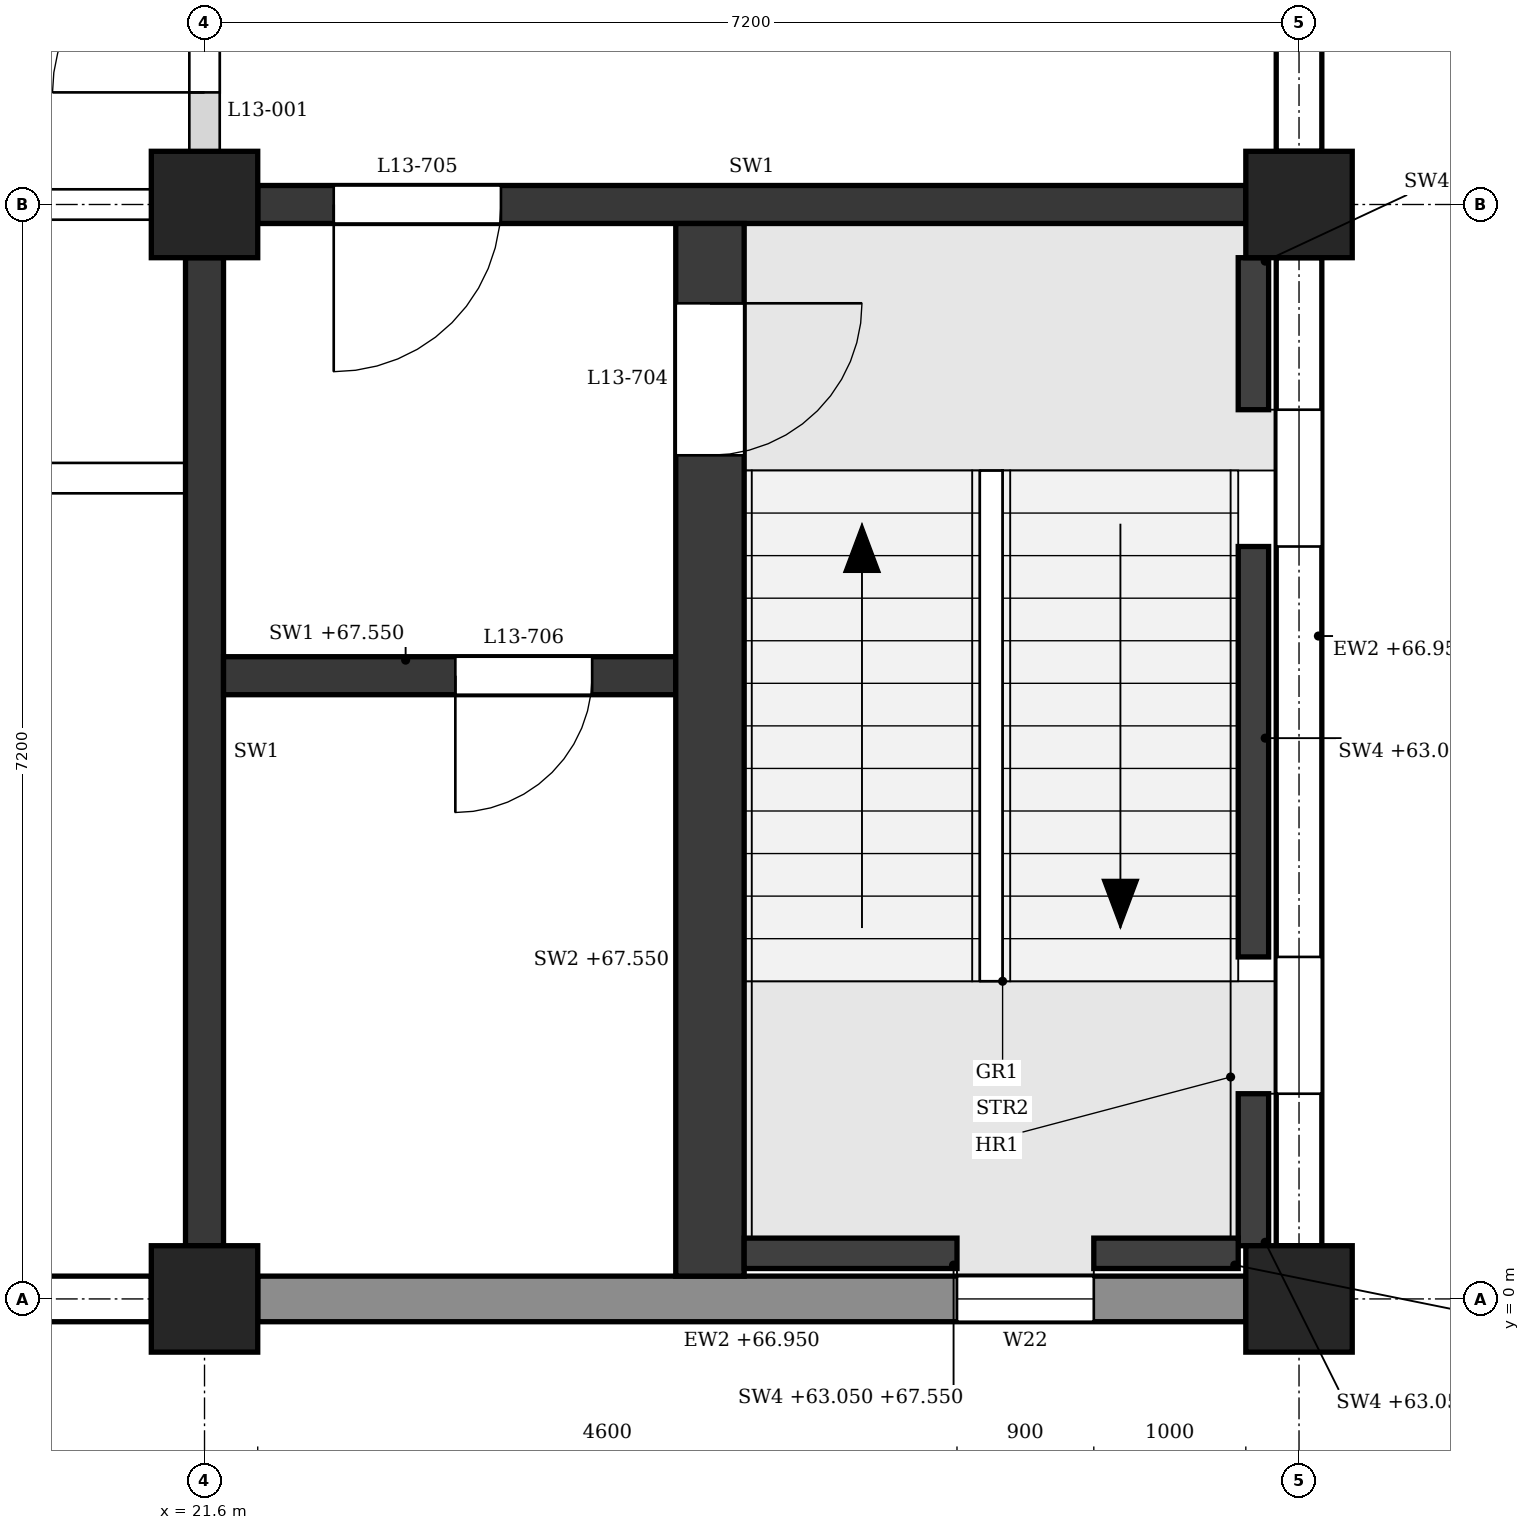
"""IFC4 building model, lengths in metres.
Left out: names, types, materials, properties, quantities, classifications, styles, units other than length and angle.
Written with IfcOpenShell. Run it as: python <this file> out.ifc"""

import sys

from ifc_helpers import new_model, si_unit, direction, frame, frame_2d, origin, origin_2d, place, context, subcontext, project, spatial, polyline, rectangle, outline, extrude, element, fill, save


model = new_model("IFC4")
c1 = context("Model", 3, precision=1e-05, world=origin(), true_north=direction((0.0, 1.0)))
c2 = subcontext(c1, "Body", "Model", "MODEL_VIEW")
j1 = project(units=[si_unit("LENGTHUNIT", "METRE"), si_unit("PLANEANGLEUNIT", "RADIAN")], contexts=[c1])
p1 = place(None, origin())
s1 = spatial("IfcSite", under=j1, at=p1, CompositionType="ELEMENT")
p2 = place(p1, origin())
s2 = spatial("IfcBuilding", under=s1, at=p2, CompositionType="ELEMENT")
p3 = place(p2, frame((0.0, 0.0, 63.3)))
s3 = spatial("IfcBuildingStorey", under=s2, at=p3, CompositionType="ELEMENT", Elevation=63.3)
for number, where, z_axis, x_axis in (
    (1, (21.6, 0.0, 0.0), (0.0, 0.0, 1.0), (1.0, 0.0, 0.0)),
    (2, (21.6, 7.2, 0.0), (0.0, 0.0, 1.0), (1.0, 0.0, 0.0)),
    (3, (28.8, 0.0, 0.0), (0.0, 0.0, 1.0), (1.0, 0.0, 0.0)),
    (4, (28.8, 7.2, 0.0), (0.0, 0.0, 1.0), (1.0, 0.0, 0.0)),
):
    element("IfcColumn", number, at=place(p3, frame(where, z_axis=z_axis, x_axis=x_axis)), inside=s3, PredefinedType="COLUMN", context=c2, shape_type="SweptSolid", body=[
        extrude(rectangle(XDim=0.7, YDim=0.7, at=origin_2d()), origin(), (0.0, 0.0, 1.0), 4.5),
    ])
p4 = place(p3, frame((14.75, 0.0, 0.0), z_axis=(0.0, 0.0, 1.0), x_axis=(1.0, 0.0, 0.0)))
e5 = element("IfcWall", 5, at=p4, inside=s3, PredefinedType="STANDARD", context=c2, shape_type="SweptSolid", body=[
    extrude(rectangle(XDim=6.5, YDim=0.3, at=frame_2d((3.25, 0.0))), origin(), (0.0, 0.0, 1.0), 3.65),
])
p5 = place(p4, frame((0.7, 0.0, 0.9)))
e6 = element("IfcOpeningElement", 6, at=p5, cuts=e5, PredefinedType="OPENING", context=c2, shape_type="SweptSolid", body=[
    extrude(outline(polyline([(0.0, 0.0), (1.5, 0.0), (1.5, 1.95), (0.75, 2.7), (0.0, 1.95), (0.0, 0.0)])), frame((0.0, 0.16, 0.0), z_axis=(0.0, -1.0, 0.0), x_axis=(1.0, 0.0, 0.0)), (0.0, 0.0, 1.0), 0.32),
])
p6 = place(p4, frame((4.3, 0.0, 0.9)))
e7 = element("IfcOpeningElement", 7, at=p6, cuts=e5, PredefinedType="OPENING", context=c2, shape_type="SweptSolid", body=[
    extrude(outline(polyline([(0.0, 0.0), (1.5, 0.0), (1.5, 1.95), (0.75, 2.7), (0.0, 1.95), (0.0, 0.0)])), frame((0.0, 0.16, 0.0), z_axis=(0.0, -1.0, 0.0), x_axis=(1.0, 0.0, 0.0)), (0.0, 0.0, 1.0), 0.32),
])
p7 = place(p3, frame((21.95, 0.0, 0.0), z_axis=(0.0, 0.0, 1.0), x_axis=(1.0, 0.0, 0.0)))
e8 = element("IfcWall", 8, at=p7, inside=s3, PredefinedType="STANDARD", context=c2, shape_type="SweptSolid", body=[
    extrude(rectangle(XDim=6.5, YDim=0.3, at=frame_2d((3.25, 0.0))), origin(), (0.0, 0.0, 1.0), 3.65),
])
p8 = place(p7, frame((4.6, 0.0, 0.9)))
e9 = element("IfcOpeningElement", 9, at=p8, cuts=e8, PredefinedType="OPENING", context=c2, shape_type="SweptSolid", body=[
    extrude(outline(polyline([(0.0, 0.0), (0.9, 0.0), (0.9, 2.25), (0.45, 2.7), (0.0, 2.25), (0.0, 0.0)])), frame((0.0, 0.16, 0.0), z_axis=(0.0, -1.0, 0.0), x_axis=(1.0, 0.0, 0.0)), (0.0, 0.0, 1.0), 0.32),
])
p9 = place(p3, frame((28.8, 0.35, 0.0), z_axis=(0.0, 0.0, 1.0), x_axis=(0.0, 1.0, 0.0)))
e10 = element("IfcWall", 10, at=p9, inside=s3, PredefinedType="STANDARD", context=c2, shape_type="SweptSolid", body=[
    extrude(rectangle(XDim=6.5, YDim=0.3, at=frame_2d((3.25, 0.0))), origin(), (0.0, 0.0, 1.0), 3.65),
])
p10 = place(p9, frame((1.0, 0.0, 0.9)))
e11 = element("IfcOpeningElement", 11, at=p10, cuts=e10, PredefinedType="OPENING", context=c2, shape_type="SweptSolid", body=[
    extrude(outline(polyline([(0.0, 0.0), (0.9, 0.0), (0.9, 2.25), (0.45, 2.7), (0.0, 2.25), (0.0, 0.0)])), frame((0.0, 0.16, 0.0), z_axis=(0.0, -1.0, 0.0), x_axis=(1.0, 0.0, 0.0)), (0.0, 0.0, 1.0), 0.32),
])
p11 = place(p9, frame((4.6, 0.0, 0.9)))
e12 = element("IfcOpeningElement", 12, at=p11, cuts=e10, PredefinedType="OPENING", context=c2, shape_type="SweptSolid", body=[
    extrude(outline(polyline([(0.0, 0.0), (0.9, 0.0), (0.9, 2.25), (0.45, 2.7), (0.0, 2.25), (0.0, 0.0)])), frame((0.0, 0.16, 0.0), z_axis=(0.0, -1.0, 0.0), x_axis=(1.0, 0.0, 0.0)), (0.0, 0.0, 1.0), 0.32),
])
p12 = place(p3, frame((28.8, 7.55, 0.0), z_axis=(0.0, 0.0, 1.0), x_axis=(0.0, 1.0, 0.0)))
e13 = element("IfcWall", 13, at=p12, inside=s3, PredefinedType="STANDARD", context=c2, shape_type="SweptSolid", body=[
    extrude(rectangle(XDim=6.5, YDim=0.3, at=frame_2d((3.25, 0.0))), origin(), (0.0, 0.0, 1.0), 3.65),
])
p13 = place(p12, frame((0.7, 0.0, 0.9)))
e14 = element("IfcOpeningElement", 14, at=p13, cuts=e13, PredefinedType="OPENING", context=c2, shape_type="SweptSolid", body=[
    extrude(outline(polyline([(0.0, 0.0), (1.5, 0.0), (1.5, 1.95), (0.75, 2.7), (0.0, 1.95), (0.0, 0.0)])), frame((0.0, 0.16, 0.0), z_axis=(0.0, -1.0, 0.0), x_axis=(1.0, 0.0, 0.0)), (0.0, 0.0, 1.0), 0.32),
])
p14 = place(p3, frame((21.95, 7.2, 0.0), z_axis=(0.0, 0.0, 1.0), x_axis=(1.0, 0.0, 0.0)))
e15 = element("IfcWall", 15, at=p14, inside=s3, PredefinedType="SHEAR", context=c2, shape_type="SweptSolid", body=[
    extrude(rectangle(XDim=6.5, YDim=0.25, at=frame_2d((3.25, 0.0))), origin(), (0.0, 0.0, 1.0), 3.6),
])
p15 = place(p14, frame((0.5, 0.0, 0.0)))
e16 = element("IfcOpeningElement", 16, at=p15, cuts=e15, PredefinedType="OPENING", context=c2, shape_type="SweptSolid", body=[
    extrude(rectangle(XDim=1.1, YDim=2.1, at=frame_2d((0.55, 1.05))), frame((0.0, 0.135, 0.0), z_axis=(0.0, -1.0, 0.0), x_axis=(1.0, 0.0, 0.0)), (0.0, 0.0, 1.0), 0.27),
])
p16 = place(p3, frame((21.6, 0.35, 0.0), z_axis=(0.0, 0.0, 1.0), x_axis=(0.0, 1.0, 0.0)))
e17 = element("IfcWall", 17, at=p16, inside=s3, PredefinedType="SHEAR", context=c2, shape_type="SweptSolid", body=[
    extrude(rectangle(XDim=6.5, YDim=0.25, at=frame_2d((3.25, 0.0))), origin(), (0.0, 0.0, 1.0), 3.6),
])
p17 = place(p3, frame((28.5, 0.35, -0.25), z_axis=(0.0, 0.0, 1.0), x_axis=(0.0, 1.0, 0.0)))
e18 = element("IfcWall", 18, at=p17, inside=s3, PredefinedType="SHEAR", context=c2, shape_type="SweptSolid", body=[
    extrude(rectangle(XDim=1.0, YDim=0.2, at=frame_2d((0.5, 0.0))), origin(), (0.0, 0.0, 1.0), 4.5),
])
p18 = place(p3, frame((28.5, 2.25, -0.25), z_axis=(0.0, 0.0, 1.0), x_axis=(0.0, 1.0, 0.0)))
e19 = element("IfcWall", 19, at=p18, inside=s3, PredefinedType="SHEAR", context=c2, shape_type="SweptSolid", body=[
    extrude(rectangle(XDim=2.7, YDim=0.2, at=frame_2d((1.35, 0.0))), origin(), (0.0, 0.0, 1.0), 4.5),
])
p19 = place(p3, frame((28.5, 5.85, -0.25), z_axis=(0.0, 0.0, 1.0), x_axis=(0.0, 1.0, 0.0)))
e20 = element("IfcWall", 20, at=p19, inside=s3, PredefinedType="SHEAR", context=c2, shape_type="SweptSolid", body=[
    extrude(rectangle(XDim=1.0, YDim=0.2, at=frame_2d((0.5, 0.0))), origin(), (0.0, 0.0, 1.0), 4.5),
])
p20 = place(p3, frame((25.15, 0.3, -0.25), z_axis=(0.0, 0.0, 1.0), x_axis=(1.0, 0.0, 0.0)))
e21 = element("IfcWall", 21, at=p20, inside=s3, PredefinedType="SHEAR", context=c2, shape_type="SweptSolid", body=[
    extrude(rectangle(XDim=1.4, YDim=0.2, at=frame_2d((0.7, 0.0))), origin(), (0.0, 0.0, 1.0), 4.5),
])
p21 = place(p3, frame((27.45, 0.3, -0.25), z_axis=(0.0, 0.0, 1.0), x_axis=(1.0, 0.0, 0.0)))
e22 = element("IfcWall", 22, at=p21, inside=s3, PredefinedType="SHEAR", context=c2, shape_type="SweptSolid", body=[
    extrude(rectangle(XDim=0.95, YDim=0.2, at=frame_2d((0.475, 0.0))), origin(), (0.0, 0.0, 1.0), 4.5),
])
p22 = place(p3, frame((24.925, 0.15, 0.0), z_axis=(0.0, 0.0, 1.0), x_axis=(0.0, 1.0, 0.0)))
e23 = element("IfcWall", 23, at=p22, inside=s3, PredefinedType="SHEAR", context=c2, shape_type="SweptSolid", body=[
    extrude(rectangle(XDim=6.925, YDim=0.45, at=frame_2d((3.462, 0.0))), origin(), (0.0, 0.0, 1.0), 4.25),
])
p23 = place(p22, frame((5.4, 0.0, 0.0)))
e24 = element("IfcOpeningElement", 24, at=p23, cuts=e23, PredefinedType="OPENING", context=c2, shape_type="SweptSolid", body=[
    extrude(rectangle(XDim=1.0, YDim=2.1, at=frame_2d((0.5, 1.05))), frame((0.0, 0.235, 0.0), z_axis=(0.0, -1.0, 0.0), x_axis=(1.0, 0.0, 0.0)), (0.0, 0.0, 1.0), 0.47),
])
p24 = place(p3, frame((21.725, 4.1, 0.0), z_axis=(0.0, 0.0, 1.0), x_axis=(1.0, 0.0, 0.0)))
e25 = element("IfcWall", 25, at=p24, inside=s3, PredefinedType="SHEAR", context=c2, shape_type="SweptSolid", body=[
    extrude(rectangle(XDim=2.975, YDim=0.25, at=frame_2d((1.487, 0.0))), origin(), (0.0, 0.0, 1.0), 4.25),
])
p25 = place(p24, frame((1.525, 0.0, 0.0)))
e26 = element("IfcOpeningElement", 26, at=p25, cuts=e25, PredefinedType="OPENING", context=c2, shape_type="SweptSolid", body=[
    extrude(rectangle(XDim=0.9, YDim=2.1, at=frame_2d((0.45, 1.05))), frame((0.0, 0.135, 0.0), z_axis=(0.0, -1.0, 0.0), x_axis=(1.0, 0.0, 0.0)), (0.0, 0.0, 1.0), 0.27),
])
p26 = place(p3, frame((7.325, 5.4, 0.0), z_axis=(0.0, 0.0, 1.0), x_axis=(1.0, 0.0, 0.0)))
e27 = element("IfcWall", 27, at=p26, inside=s3, PredefinedType="PARTITIONING", context=c2, shape_type="SweptSolid", body=[
    extrude(outline(polyline([(0.0, 0.0), (14.15, 0.0), (14.15, 3.6), (14.075, 3.6), (14.075, 4.25), (7.275, 4.25), (7.275, 3.6), (6.875, 3.6), (6.875, 4.25), (0.075, 4.25), (0.075, 3.6), (0.0, 3.6), (0.0, 0.0)])), frame((0.0, 0.1, 0.0), z_axis=(0.0, -1.0, 0.0), x_axis=(1.0, 0.0, 0.0)), (0.0, 0.0, 1.0), 0.2),
])
p27 = place(p26, frame((1.238, 0.0, 0.0)))
e28 = element("IfcOpeningElement", 28, at=p27, cuts=e27, PredefinedType="OPENING", context=c2, shape_type="SweptSolid", body=[
    extrude(rectangle(XDim=1.0, YDim=2.1, at=frame_2d((0.5, 1.05))), frame((0.0, 0.11, 0.0), z_axis=(0.0, -1.0, 0.0), x_axis=(1.0, 0.0, 0.0)), (0.0, 0.0, 1.0), 0.22),
])
p28 = place(p26, frame((4.775, 0.0, 0.0)))
e29 = element("IfcOpeningElement", 29, at=p28, cuts=e27, PredefinedType="OPENING", context=c2, shape_type="SweptSolid", body=[
    extrude(rectangle(XDim=1.0, YDim=2.1, at=frame_2d((0.5, 1.05))), frame((0.0, 0.11, 0.0), z_axis=(0.0, -1.0, 0.0), x_axis=(1.0, 0.0, 0.0)), (0.0, 0.0, 1.0), 0.22),
])
p29 = place(p26, frame((8.375, 0.0, 0.0)))
e30 = element("IfcOpeningElement", 30, at=p29, cuts=e27, PredefinedType="OPENING", context=c2, shape_type="SweptSolid", body=[
    extrude(rectangle(XDim=1.0, YDim=2.1, at=frame_2d((0.5, 1.05))), frame((0.0, 0.11, 0.0), z_axis=(0.0, -1.0, 0.0), x_axis=(1.0, 0.0, 0.0)), (0.0, 0.0, 1.0), 0.22),
])
p30 = place(p26, frame((11.913, 0.0, 0.0)))
e31 = element("IfcOpeningElement", 31, at=p30, cuts=e27, PredefinedType="OPENING", context=c2, shape_type="SweptSolid", body=[
    extrude(rectangle(XDim=1.0, YDim=2.1, at=frame_2d((0.5, 1.05))), frame((0.0, 0.11, 0.0), z_axis=(0.0, -1.0, 0.0), x_axis=(1.0, 0.0, 0.0)), (0.0, 0.0, 1.0), 0.22),
])
p31 = place(p3, frame((14.75, 7.2, 0.0), z_axis=(0.0, 0.0, 1.0), x_axis=(1.0, 0.0, 0.0)))
e32 = element("IfcWall", 32, at=p31, inside=s3, PredefinedType="PARTITIONING", context=c2, shape_type="SweptSolid", body=[
    extrude(rectangle(XDim=6.5, YDim=0.2, at=frame_2d((3.25, 0.0))), origin(), (0.0, 0.0, 1.0), 3.6),
])
p32 = place(p31, frame((4.375, 0.0, 0.0)))
e33 = element("IfcOpeningElement", 33, at=p32, cuts=e32, PredefinedType="OPENING", context=c2, shape_type="SweptSolid", body=[
    extrude(rectangle(XDim=1.0, YDim=2.1, at=frame_2d((0.5, 1.05))), frame((0.0, 0.11, 0.0), z_axis=(0.0, -1.0, 0.0), x_axis=(1.0, 0.0, 0.0)), (0.0, 0.0, 1.0), 0.22),
])
p33 = place(p3, frame((21.6, 7.55, 0.0), z_axis=(0.0, 0.0, 1.0), x_axis=(0.0, 1.0, 0.0)))
e34 = element("IfcWall", 34, at=p33, inside=s3, PredefinedType="PARTITIONING", context=c2, shape_type="SweptSolid", body=[
    extrude(rectangle(XDim=2.775, YDim=0.2, at=frame_2d((1.387, 0.0))), origin(), (0.0, 0.0, 1.0), 3.6),
])
p34 = place(p33, frame((0.387, 0.0, 0.0)))
e35 = element("IfcOpeningElement", 35, at=p34, cuts=e34, PredefinedType="OPENING", context=c2, shape_type="SweptSolid", body=[
    extrude(rectangle(XDim=2.0, YDim=2.4, at=frame_2d((1.0, 1.2))), frame((0.0, 0.11, 0.0), z_axis=(0.0, -1.0, 0.0), x_axis=(1.0, 0.0, 0.0)), (0.0, 0.0, 1.0), 0.22),
])
p35 = place(p10, origin())
e36 = element("IfcWindow", 36, at=p35, inside=s3, PartitioningType="SINGLE_PANEL", PredefinedType="WINDOW", context=c2, shape_type="SweptSolid", body=[
    extrude(outline(polyline([(0.0, 0.0), (0.9, 0.0), (0.9, 2.25), (0.45, 2.7), (0.0, 2.25), (0.0, 0.0)])), frame((0.0, 0.03, 0.0), z_axis=(0.0, -1.0, 0.0), x_axis=(1.0, 0.0, 0.0)), (0.0, 0.0, 1.0), 0.06),
])
fill(e11, e36)
p36 = place(p11, origin())
e37 = element("IfcWindow", 37, at=p36, inside=s3, PartitioningType="SINGLE_PANEL", PredefinedType="WINDOW", context=c2, shape_type="SweptSolid", body=[
    extrude(outline(polyline([(0.0, 0.0), (0.9, 0.0), (0.9, 2.25), (0.45, 2.7), (0.0, 2.25), (0.0, 0.0)])), frame((0.0, 0.03, 0.0), z_axis=(0.0, -1.0, 0.0), x_axis=(1.0, 0.0, 0.0)), (0.0, 0.0, 1.0), 0.06),
])
fill(e12, e37)
p37 = place(p8, origin())
e38 = element("IfcWindow", 38, at=p37, inside=s3, PartitioningType="SINGLE_PANEL", PredefinedType="WINDOW", context=c2, shape_type="SweptSolid", body=[
    extrude(outline(polyline([(0.0, 0.0), (0.9, 0.0), (0.9, 2.25), (0.45, 2.7), (0.0, 2.25), (0.0, 0.0)])), frame((0.0, 0.03, 0.0), z_axis=(0.0, -1.0, 0.0), x_axis=(1.0, 0.0, 0.0)), (0.0, 0.0, 1.0), 0.06),
])
fill(e9, e38)
p38 = place(p23, frame((1.0, 0.0, 0.0), z_axis=(0.0, 0.0, 1.0), x_axis=(-1.0, 0.0, 0.0)))
e39 = element("IfcDoor", 39, at=p38, inside=s3, OperationType="SINGLE_SWING_LEFT", PredefinedType="DOOR", context=c2, shape_type="SweptSolid", body=[
    extrude(rectangle(XDim=1.0, YDim=2.1, at=frame_2d((0.5, 1.05))), frame((0.0, 0.025, 0.0), z_axis=(0.0, -1.0, 0.0), x_axis=(1.0, 0.0, 0.0)), (0.0, 0.0, 1.0), 0.05),
])
fill(e24, e39)
p39 = place(p15, frame((1.1, 0.0, 0.0), z_axis=(0.0, 0.0, 1.0), x_axis=(-1.0, 0.0, 0.0)))
e40 = element("IfcDoor", 40, at=p39, inside=s3, OperationType="SINGLE_SWING_RIGHT", PredefinedType="DOOR", context=c2, shape_type="SweptSolid", body=[
    extrude(rectangle(XDim=1.1, YDim=2.1, at=frame_2d((0.55, 1.05))), frame((0.0, 0.025, 0.0), z_axis=(0.0, -1.0, 0.0), x_axis=(1.0, 0.0, 0.0)), (0.0, 0.0, 1.0), 0.05),
])
fill(e16, e40)
p40 = place(p25, frame((0.9, 0.0, 0.0), z_axis=(0.0, 0.0, 1.0), x_axis=(-1.0, 0.0, 0.0)))
e41 = element("IfcDoor", 41, at=p40, inside=s3, OperationType="SINGLE_SWING_RIGHT", PredefinedType="DOOR", context=c2, shape_type="SweptSolid", body=[
    extrude(rectangle(XDim=0.9, YDim=2.1, at=frame_2d((0.45, 1.05))), frame((0.0, 0.025, 0.0), z_axis=(0.0, -1.0, 0.0), x_axis=(1.0, 0.0, 0.0)), (0.0, 0.0, 1.0), 0.05),
])
fill(e26, e41)
p41 = place(p34, origin())
e42 = element("IfcDoor", 42, at=p41, inside=s3, OperationType="DOUBLE_DOOR_SINGLE_SWING", PredefinedType="DOOR", context=c2, shape_type="SweptSolid", body=[
    extrude(rectangle(XDim=2.0, YDim=2.4, at=frame_2d((1.0, 1.2))), frame((0.0, 0.025, 0.0), z_axis=(0.0, -1.0, 0.0), x_axis=(1.0, 0.0, 0.0)), (0.0, 0.0, 1.0), 0.05),
])
fill(e35, e42)
save(model, sys.argv[1])
